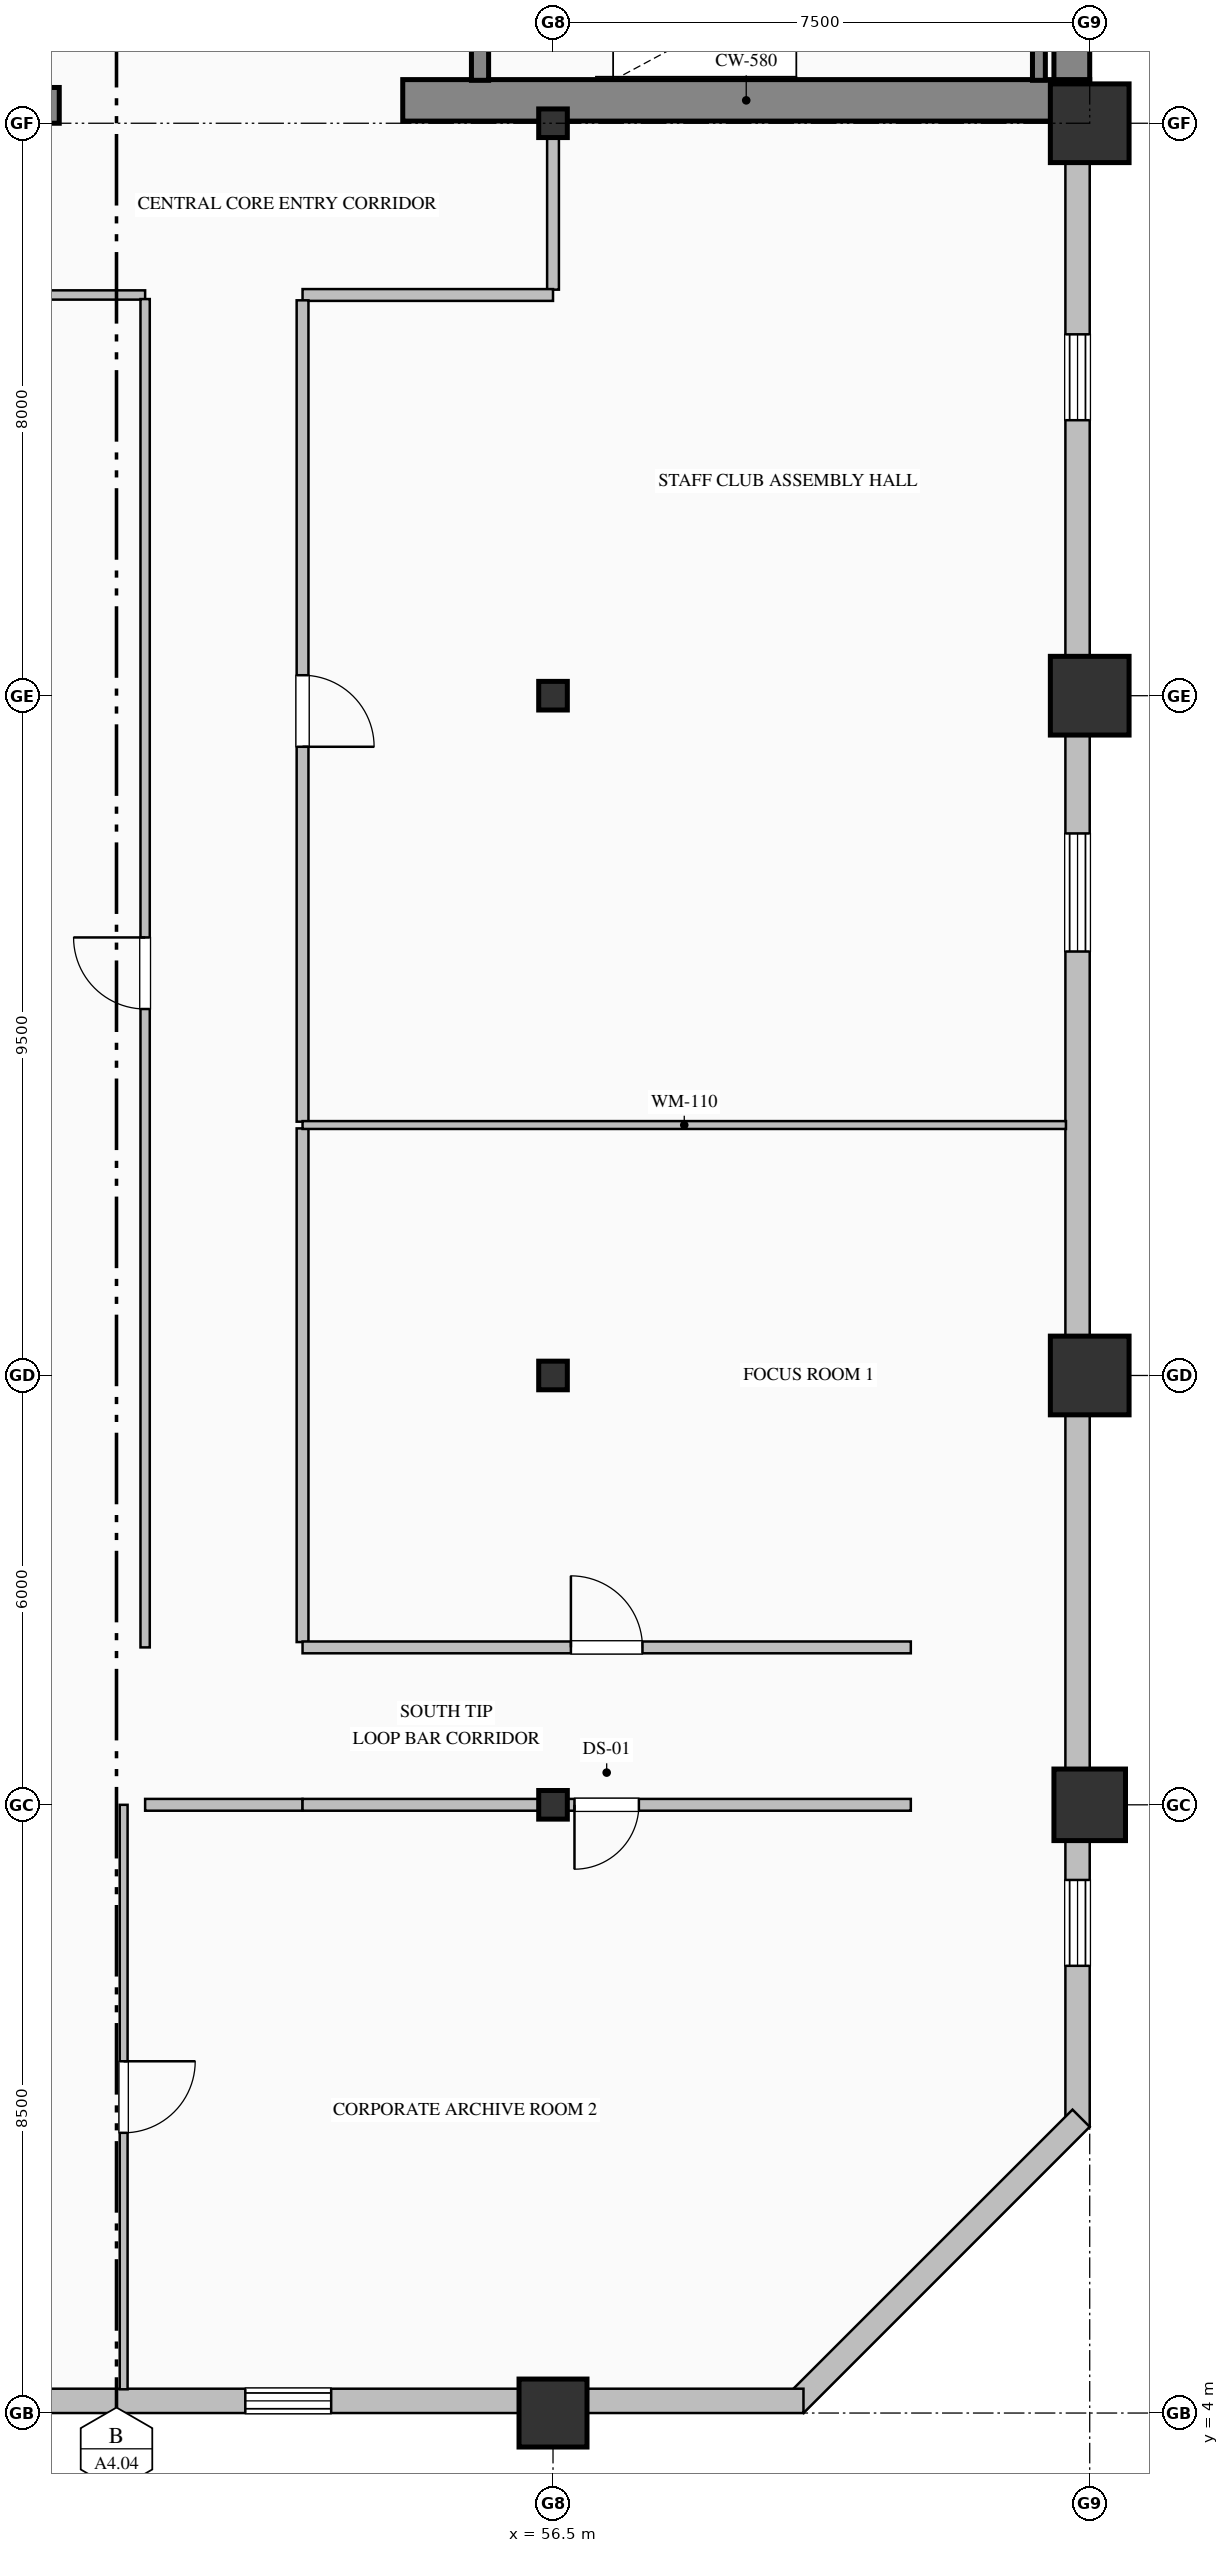
"""IFC4 building model, lengths in metres.
Left out: names, types, materials, properties, quantities, classifications, styles, units other than length and angle.
Written with IfcOpenShell. Run it as: python <this file> out.ifc"""

import sys

from ifc_helpers import new_model, si_unit, direction, frame, frame_2d, origin, origin_2d, place, context, subcontext, project, spatial, rectangle, hollow_rectangle, hollow_circle, i_section, extrude, element, fill, save


model = new_model("IFC4")
c1 = context("Model", 3, precision=1e-05, world=origin(), true_north=direction((0.0, 1.0)))
c2 = subcontext(c1, "Body", "Model", "MODEL_VIEW")
j1 = project(units=[si_unit("LENGTHUNIT", "METRE"), si_unit("PLANEANGLEUNIT", "RADIAN")], contexts=[c1])
p1 = place(None, origin())
s1 = spatial("IfcSite", under=j1, at=p1, CompositionType="ELEMENT")
p2 = place(p1, origin())
s2 = spatial("IfcBuilding", under=s1, at=p2, CompositionType="ELEMENT")
p3 = place(p2, frame((0.0, 0.0, 147.0)))
s3 = spatial("IfcBuildingStorey", under=s2, at=p3, CompositionType="ELEMENT", Elevation=147.0)
p4 = place(p3, frame((63.75, 36.32, 0.0), z_axis=(0.0, 0.0, 1.0), x_axis=(0.0, 1.0, 0.0)))
e1 = element("IfcWall", 1, at=p4, inside=s3, PredefinedType="SHEAR", context=c2, shape_type="SweptSolid", body=[
    extrude(rectangle(XDim=15.18, YDim=0.5, at=frame_2d((7.59, 0.0))), origin(), (0.0, 0.0, 1.0), 3.765),
])
p5 = place(p3, frame((40.5, 36.25, 0.0), z_axis=(0.0, 0.0, 1.0), x_axis=(1.0, 0.0, 0.0)))
e2 = element("IfcWall", 2, at=p5, inside=s3, PredefinedType="SHEAR", context=c2, shape_type="SweptSolid", body=[
    extrude(rectangle(XDim=9.1, YDim=0.5, at=frame_2d((4.55, 0.0))), origin(), (0.0, 0.0, 1.0), 3.765),
])
p6 = place(p3, frame((54.4, 36.32, 0.0), z_axis=(0.0, 0.0, 1.0), x_axis=(1.0, 0.0, 0.0)))
e3 = element("IfcWall", 3, at=p6, inside=s3, PredefinedType="SHEAR", context=c2, shape_type="SweptSolid", body=[
    extrude(rectangle(XDim=9.6, YDim=0.58, at=frame_2d((4.8, 0.0))), origin(), (0.0, 0.0, 1.0), 4.0),
])
p7 = place(p3, frame((56.5, 4.0, 0.0), z_axis=(0.0, 0.0, 1.0), x_axis=(1.0, 0.0, 0.0)))
e4 = element("IfcColumn", 4, at=p7, inside=s3, PredefinedType="COLUMN", context=c2, shape_type="SweptSolid", body=[
    extrude(hollow_rectangle(XDim=0.95, YDim=0.95, WallThickness=0.036, at=origin_2d()), origin(), (0.0, 0.0, 1.0), 4.0),
])
for number, where, z_axis, x_axis in (
    (5, (56.5, 12.5, 0.0), (0.0, 0.0, 1.0), (1.0, 0.0, 0.0)),
    (6, (56.5, 18.5, 0.0), (0.0, 0.0, 1.0), (1.0, 0.0, 0.0)),
    (7, (56.5, 28.0, 0.0), (0.0, 0.0, 1.0), (1.0, 0.0, 0.0)),
    (8, (56.5, 36.0, 0.0), (0.0, 0.0, 1.0), (1.0, 0.0, 0.0)),
):
    element("IfcColumn", number, at=place(p3, frame(where, z_axis=z_axis, x_axis=x_axis)), inside=s3, PredefinedType="COLUMN", context=c2, shape_type="SweptSolid", body=[
        extrude(i_section(OverallWidth=0.4, OverallDepth=0.4, WebThickness=0.013, FlangeThickness=0.021, FilletRadius=0.022, at=origin_2d()), origin(), (0.0, 0.0, 1.0), 4.0),
    ])
p8 = place(p3, frame((64.0, 12.5, 0.0), z_axis=(0.0, 0.0, 1.0), x_axis=(1.0, 0.0, 0.0)))
e9 = element("IfcColumn", 9, at=p8, inside=s3, PredefinedType="COLUMN", context=c2, shape_type="SweptSolid", body=[
    extrude(hollow_circle(Radius=0.5, WallThickness=0.036, at=origin_2d()), origin(), (0.0, 0.0, 1.0), 4.0),
])
for number, where, z_axis, x_axis in (
    (10, (64.0, 18.5, 0.0), (0.0, 0.0, 1.0), (1.0, 0.0, 0.0)),
    (11, (64.0, 28.0, 0.0), (0.0, 0.0, 1.0), (1.0, 0.0, 0.0)),
    (12, (64.0, 36.0, 0.0), (0.0, 0.0, 1.0), (1.0, 0.0, 0.0)),
):
    element("IfcColumn", number, at=place(p3, frame(where, z_axis=z_axis, x_axis=x_axis)), inside=s3, PredefinedType="COLUMN", context=c2, shape_type="SweptSolid", body=[
        extrude(hollow_rectangle(XDim=1.1, YDim=1.1, WallThickness=0.04, at=origin_2d()), origin(), (0.0, 0.0, 1.0), 4.0),
    ])
p9 = place(p3, frame((63.83, 36.05, 0.0), z_axis=(0.0, 0.0, 1.0), x_axis=(0.0, -1.0, 0.0)))
e13 = element("IfcWall", 13, at=p9, inside=s3, PredefinedType="SOLIDWALL", context=c2, shape_type="SweptSolid", body=[
    extrude(rectangle(XDim=28.05, YDim=0.34, at=frame_2d((14.025, 0.0))), origin(), (0.0, 0.0, 1.0), 3.265),
])
p10 = place(p9, frame((3.0, 0.0, 0.7)))
e14 = element("IfcOpeningElement", 14, at=p10, cuts=e13, PredefinedType="OPENING", context=c2, shape_type="SweptSolid", body=[
    extrude(rectangle(XDim=1.2, YDim=1.85, at=frame_2d((0.6, 0.925))), frame((0.0, 0.18, 0.0), z_axis=(0.0, -1.0, 0.0), x_axis=(1.0, 0.0, 0.0)), (0.0, 0.0, 1.0), 0.36),
])
p11 = place(p9, frame((9.975, 0.0, 0.85)))
e15 = element("IfcOpeningElement", 15, at=p11, cuts=e13, PredefinedType="OPENING", context=c2, shape_type="SweptSolid", body=[
    extrude(rectangle(XDim=1.65, YDim=1.95, at=frame_2d((0.825, 0.975))), frame((0.0, 0.18, 0.0), z_axis=(0.0, -1.0, 0.0), x_axis=(1.0, 0.0, 0.0)), (0.0, 0.0, 1.0), 0.36),
])
p12 = place(p9, frame((24.6, 0.0, 0.7)))
e16 = element("IfcOpeningElement", 16, at=p12, cuts=e13, PredefinedType="OPENING", context=c2, shape_type="SweptSolid", body=[
    extrude(rectangle(XDim=1.2, YDim=1.85, at=frame_2d((0.6, 0.925))), frame((0.0, 0.18, 0.0), z_axis=(0.0, -1.0, 0.0), x_axis=(1.0, 0.0, 0.0)), (0.0, 0.0, 1.0), 0.36),
])
p13 = place(p3, frame((63.88, 8.12, 0.0), z_axis=(0.0, 0.0, 1.0), x_axis=(-0.707106781187, -0.707106781187, 0.0)))
e17 = element("IfcWall", 17, at=p13, inside=s3, PredefinedType="SOLIDWALL", context=c2, shape_type="SweptSolid", body=[
    extrude(rectangle(XDim=5.657, YDim=0.34, at=frame_2d((2.828, 0.0))), origin(), (0.0, 0.0, 1.0), 3.765),
])
p14 = place(p3, frame((60.0, 4.17, 0.0), z_axis=(0.0, 0.0, 1.0), x_axis=(-1.0, 0.0, 0.0)))
e18 = element("IfcWall", 18, at=p14, inside=s3, PredefinedType="SOLIDWALL", context=c2, shape_type="SweptSolid", body=[
    extrude(rectangle(XDim=15.5, YDim=0.34, at=frame_2d((7.75, 0.0))), origin(), (0.0, 0.0, 1.0), 3.265),
])
p15 = place(p14, frame((6.6, 0.0, 0.7)))
e19 = element("IfcOpeningElement", 19, at=p15, cuts=e18, PredefinedType="OPENING", context=c2, shape_type="SweptSolid", body=[
    extrude(rectangle(XDim=1.2, YDim=1.85, at=frame_2d((0.6, 0.925))), frame((0.0, 0.18, 0.0), z_axis=(0.0, -1.0, 0.0), x_axis=(1.0, 0.0, 0.0)), (0.0, 0.0, 1.0), 0.36),
])
p16 = place(p3, frame((55.48, 39.75, 0.0), z_axis=(0.0, 0.0, 1.0), x_axis=(0.0, -1.0, 0.0)))
e20 = element("IfcWall", 20, at=p16, inside=s3, PredefinedType="SOLIDWALL", context=c2, shape_type="SweptSolid", body=[
    extrude(rectangle(XDim=3.15, YDim=0.24, at=frame_2d((1.575, 0.0))), origin(), (0.0, 0.0, 1.0), 4.0),
])
p17 = place(p16, frame((1.0, 0.0, 0.0)))
e21 = element("IfcOpeningElement", 21, at=p17, cuts=e20, PredefinedType="OPENING", context=c2, shape_type="SweptSolid", body=[
    extrude(rectangle(XDim=1.15, YDim=2.2, at=frame_2d((0.575, 1.1))), frame((0.0, 0.13, 0.0), z_axis=(0.0, -1.0, 0.0), x_axis=(1.0, 0.0, 0.0)), (0.0, 0.0, 1.0), 0.26),
])
p18 = place(p3, frame((63.29, 36.6, 0.0), z_axis=(0.0, 0.0, 1.0), x_axis=(0.0, 1.0, 0.0)))
e22 = element("IfcWall", 22, at=p18, inside=s3, PredefinedType="SOLIDWALL", context=c2, shape_type="SweptSolid", body=[
    extrude(rectangle(XDim=3.15, YDim=0.18, at=frame_2d((1.575, 0.0))), origin(), (0.0, 0.0, 1.0), 4.0),
])
p19 = place(p3, frame((56.5, 36.0, 0.0), z_axis=(0.0, 0.0, 1.0), x_axis=(0.0, -1.0, 0.0)))
e23 = element("IfcWall", 23, at=p19, inside=s3, PredefinedType="PARTITIONING", context=c2, shape_type="SweptSolid", body=[
    extrude(rectangle(XDim=2.325, YDim=0.165, at=frame_2d((1.163, 0.0))), origin(), (0.0, 0.0, 1.0), 3.157),
])
p20 = place(p3, frame((56.5, 33.6, 0.0), z_axis=(0.0, 0.0, 1.0), x_axis=(-1.0, 0.0, 0.0)))
e24 = element("IfcWall", 24, at=p20, inside=s3, PredefinedType="PARTITIONING", context=c2, shape_type="SweptSolid", body=[
    extrude(rectangle(XDim=3.5, YDim=0.165, at=frame_2d((1.75, 0.0))), origin(), (0.0, 0.0, 1.0), 3.765),
])
p21 = place(p3, frame((50.8, 33.6, 0.0), z_axis=(0.0, 0.0, 1.0), x_axis=(-1.0, 0.0, 0.0)))
e25 = element("IfcWall", 25, at=p21, inside=s3, PredefinedType="PARTITIONING", context=c2, shape_type="SweptSolid", body=[
    extrude(rectangle(XDim=10.3, YDim=0.13, at=frame_2d((5.15, 0.0))), origin(), (0.0, 0.0, 1.0), 3.765),
])
p22 = place(p3, frame((53.0, 33.525, 0.0), z_axis=(0.0, 0.0, 1.0), x_axis=(0.0, -1.0, 0.0)))
e26 = element("IfcWall", 26, at=p22, inside=s3, PredefinedType="PARTITIONING", context=c2, shape_type="SweptSolid", body=[
    extrude(rectangle(XDim=11.478, YDim=0.165, at=frame_2d((5.739, 0.0))), origin(), (0.0, 0.0, 1.0), 3.765),
])
p23 = place(p22, frame((5.239, 0.0, 0.0)))
e27 = element("IfcOpeningElement", 27, at=p23, cuts=e26, PredefinedType="OPENING", context=c2, shape_type="SweptSolid", body=[
    extrude(rectangle(XDim=1.0, YDim=2.15, at=frame_2d((0.5, 1.075))), frame((0.0, 0.093, 0.0), z_axis=(0.0, -1.0, 0.0), x_axis=(1.0, 0.0, 0.0)), (0.0, 0.0, 1.0), 0.185),
])
p24 = place(p3, frame((53.0, 21.953, 0.0), z_axis=(0.0, 0.0, 1.0), x_axis=(0.0, -1.0, 0.0)))
e28 = element("IfcWall", 28, at=p24, inside=s3, PredefinedType="PARTITIONING", context=c2, shape_type="SweptSolid", body=[
    extrude(rectangle(XDim=7.178, YDim=0.165, at=frame_2d((3.589, 0.0))), origin(), (0.0, 0.0, 1.0), 3.765),
])
p25 = place(p3, frame((50.8, 14.7, 0.0), z_axis=(0.0, 0.0, 1.0), x_axis=(0.0, 1.0, 0.0)))
e29 = element("IfcWall", 29, at=p25, inside=s3, PredefinedType="PARTITIONING", context=c2, shape_type="SweptSolid", body=[
    extrude(rectangle(XDim=18.843, YDim=0.13, at=frame_2d((9.421, 0.0))), origin(), (0.0, 0.0, 1.0), 3.765),
])
p26 = place(p25, frame((8.921, 0.0, 0.0)))
e30 = element("IfcOpeningElement", 30, at=p26, cuts=e29, PredefinedType="OPENING", context=c2, shape_type="SweptSolid", body=[
    extrude(rectangle(XDim=1.0, YDim=2.15, at=frame_2d((0.5, 1.075))), frame((0.0, 0.075, 0.0), z_axis=(0.0, -1.0, 0.0), x_axis=(1.0, 0.0, 0.0)), (0.0, 0.0, 1.0), 0.15),
])
p27 = place(p3, frame((53.0, 12.5, 0.0), z_axis=(0.0, 0.0, 1.0), x_axis=(-1.0, 0.0, 0.0)))
e31 = element("IfcWall", 31, at=p27, inside=s3, PredefinedType="PARTITIONING", context=c2, shape_type="SweptSolid", body=[
    extrude(rectangle(XDim=2.2, YDim=0.165, at=frame_2d((1.1, 0.0))), origin(), (0.0, 0.0, 1.0), 3.157),
])
p28 = place(p3, frame((53.0, 14.7, 0.0), z_axis=(0.0, 0.0, 1.0), x_axis=(1.0, 0.0, 0.0)))
e32 = element("IfcWall", 32, at=p28, inside=s3, PredefinedType="PARTITIONING", context=c2, shape_type="SweptSolid", body=[
    extrude(rectangle(XDim=8.5, YDim=0.165, at=frame_2d((4.25, 0.0))), origin(), (0.0, 0.0, 1.0), 3.765),
])
p29 = place(p28, frame((3.75, 0.0, 0.0)))
e33 = element("IfcOpeningElement", 33, at=p29, cuts=e32, PredefinedType="OPENING", context=c2, shape_type="SweptSolid", body=[
    extrude(rectangle(XDim=1.0, YDim=2.15, at=frame_2d((0.5, 1.075))), frame((0.0, 0.093, 0.0), z_axis=(0.0, -1.0, 0.0), x_axis=(1.0, 0.0, 0.0)), (0.0, 0.0, 1.0), 0.185),
])
p30 = place(p3, frame((61.5, 12.5, 0.0), z_axis=(0.0, 0.0, 1.0), x_axis=(-1.0, 0.0, 0.0)))
e34 = element("IfcWall", 34, at=p30, inside=s3, PredefinedType="PARTITIONING", context=c2, shape_type="SweptSolid", body=[
    extrude(rectangle(XDim=8.5, YDim=0.165, at=frame_2d((4.25, 0.0))), origin(), (0.0, 0.0, 1.0), 3.157),
])
p31 = place(p30, frame((3.8, 0.0, 0.0)))
e35 = element("IfcOpeningElement", 35, at=p31, cuts=e34, PredefinedType="OPENING", context=c2, shape_type="SweptSolid", body=[
    extrude(rectangle(XDim=0.9, YDim=2.15, at=frame_2d((0.45, 1.075))), frame((0.0, 0.093, 0.0), z_axis=(0.0, -1.0, 0.0), x_axis=(1.0, 0.0, 0.0)), (0.0, 0.0, 1.0), 0.185),
])
p32 = place(p3, frame((63.668, 22.0, 0.0), z_axis=(0.0, 0.0, 1.0), x_axis=(-1.0, 0.0, 0.0)))
e36 = element("IfcWall", 36, at=p32, inside=s3, PredefinedType="MOVABLE", context=c2, shape_type="SweptSolid", body=[
    extrude(rectangle(XDim=10.668, YDim=0.11, at=frame_2d((5.334, 0.0))), origin(), (0.0, 0.0, 1.0), 3.765),
])
p33 = place(p3, frame((50.5, 12.5, 0.0), z_axis=(0.0, 0.0, 1.0), x_axis=(0.0, -1.0, 0.0)))
e37 = element("IfcWall", 37, at=p33, inside=s3, PredefinedType="MOVABLE", context=c2, shape_type="SweptSolid", body=[
    extrude(rectangle(XDim=8.168, YDim=0.11, at=frame_2d((4.084, 0.0))), origin(), (0.0, 0.0, 1.0), 3.765),
])
p34 = place(p33, frame((3.584, 0.0, 0.0)))
e38 = element("IfcOpeningElement", 38, at=p34, cuts=e37, PredefinedType="OPENING", context=c2, shape_type="SweptSolid", body=[
    extrude(rectangle(XDim=1.0, YDim=2.15, at=frame_2d((0.5, 1.075))), frame((0.0, 0.065, 0.0), z_axis=(0.0, -1.0, 0.0), x_axis=(1.0, 0.0, 0.0)), (0.0, 0.0, 1.0), 0.13),
])
p35 = place(p10, origin())
e39 = element("IfcWindow", 39, at=p35, inside=s3, PartitioningType="DOUBLE_PANEL_VERTICAL", PredefinedType="WINDOW", context=c2, shape_type="SweptSolid", body=[
    extrude(rectangle(XDim=1.2, YDim=1.85, at=frame_2d((0.6, 0.925))), frame((0.0, 0.15, 0.0), z_axis=(0.0, -1.0, 0.0), x_axis=(1.0, 0.0, 0.0)), (0.0, 0.0, 1.0), 0.06),
])
fill(e14, e39)
p36 = place(p11, origin())
e40 = element("IfcWindow", 40, at=p36, inside=s3, PartitioningType="DOUBLE_PANEL_VERTICAL", PredefinedType="WINDOW", context=c2, shape_type="SweptSolid", body=[
    extrude(rectangle(XDim=1.65, YDim=1.95, at=frame_2d((0.825, 0.975))), frame((0.0, 0.15, 0.0), z_axis=(0.0, -1.0, 0.0), x_axis=(1.0, 0.0, 0.0)), (0.0, 0.0, 1.0), 0.06),
])
fill(e15, e40)
p37 = place(p12, origin())
e41 = element("IfcWindow", 41, at=p37, inside=s3, PartitioningType="DOUBLE_PANEL_VERTICAL", PredefinedType="WINDOW", context=c2, shape_type="SweptSolid", body=[
    extrude(rectangle(XDim=1.2, YDim=1.85, at=frame_2d((0.6, 0.925))), frame((0.0, 0.15, 0.0), z_axis=(0.0, -1.0, 0.0), x_axis=(1.0, 0.0, 0.0)), (0.0, 0.0, 1.0), 0.06),
])
fill(e16, e41)
p38 = place(p15, origin())
e42 = element("IfcWindow", 42, at=p38, inside=s3, PartitioningType="DOUBLE_PANEL_VERTICAL", PredefinedType="WINDOW", context=c2, shape_type="SweptSolid", body=[
    extrude(rectangle(XDim=1.2, YDim=1.85, at=frame_2d((0.6, 0.925))), frame((0.0, 0.15, 0.0), z_axis=(0.0, -1.0, 0.0), x_axis=(1.0, 0.0, 0.0)), (0.0, 0.0, 1.0), 0.06),
])
fill(e19, e42)
p39 = place(p23, origin())
e43 = element("IfcDoor", 43, at=p39, inside=s3, OperationType="SINGLE_SWING_RIGHT", PredefinedType="DOOR", context=c2, shape_type="SweptSolid", body=[
    extrude(rectangle(XDim=1.0, YDim=2.15, at=frame_2d((0.5, 1.075))), frame((0.0, 0.025, 0.0), z_axis=(0.0, -1.0, 0.0), x_axis=(1.0, 0.0, 0.0)), (0.0, 0.0, 1.0), 0.05),
])
fill(e27, e43)
p40 = place(p29, origin())
e44 = element("IfcDoor", 44, at=p40, inside=s3, OperationType="SINGLE_SWING_LEFT", PredefinedType="DOOR", context=c2, shape_type="SweptSolid", body=[
    extrude(rectangle(XDim=1.0, YDim=2.15, at=frame_2d((0.5, 1.075))), frame((0.0, 0.025, 0.0), z_axis=(0.0, -1.0, 0.0), x_axis=(1.0, 0.0, 0.0)), (0.0, 0.0, 1.0), 0.05),
])
fill(e33, e44)
p41 = place(p26, origin())
e45 = element("IfcDoor", 45, at=p41, inside=s3, OperationType="SINGLE_SWING_RIGHT", PredefinedType="DOOR", context=c2, shape_type="SweptSolid", body=[
    extrude(rectangle(XDim=1.0, YDim=2.15, at=frame_2d((0.5, 1.075))), frame((0.0, 0.025, 0.0), z_axis=(0.0, -1.0, 0.0), x_axis=(1.0, 0.0, 0.0)), (0.0, 0.0, 1.0), 0.05),
])
fill(e30, e45)
p42 = place(p34, origin())
e46 = element("IfcDoor", 46, at=p42, inside=s3, OperationType="SINGLE_SWING_LEFT", PredefinedType="DOOR", context=c2, shape_type="SweptSolid", body=[
    extrude(rectangle(XDim=1.0, YDim=2.15, at=frame_2d((0.5, 1.075))), frame((0.0, 0.025, 0.0), z_axis=(0.0, -1.0, 0.0), x_axis=(1.0, 0.0, 0.0)), (0.0, 0.0, 1.0), 0.05),
])
fill(e38, e46)
p43 = place(p31, origin())
e47 = element("IfcDoor", 47, at=p43, inside=s3, OperationType="SINGLE_SWING_RIGHT", PredefinedType="DOOR", context=c2, shape_type="SweptSolid", body=[
    extrude(rectangle(XDim=0.9, YDim=2.15, at=frame_2d((0.45, 1.075))), frame((0.0, 0.025, 0.0), z_axis=(0.0, -1.0, 0.0), x_axis=(1.0, 0.0, 0.0)), (0.0, 0.0, 1.0), 0.05),
])
fill(e35, e47)
save(model, sys.argv[1])
